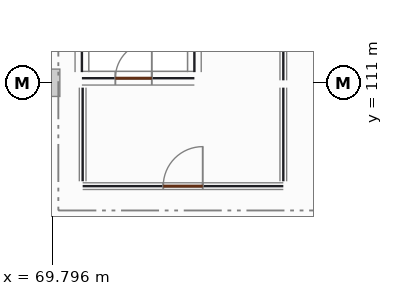
"""IFC4 building model, lengths in metres.
Left out: names, types, materials, properties, quantities, classifications, styles, units other than length and angle.
Written with IfcOpenShell. Run it as: python <this file> out.ifc"""

import sys

from ifc_helpers import new_model, si_unit, direction, frame, frame_2d, origin, origin_2d, place, context, subcontext, project, spatial, rectangle, extrude, element, fill, save


model = new_model("IFC4")
c1 = context("Model", 3, precision=1e-05, world=origin(), true_north=direction((0.0, 1.0)))
c2 = subcontext(c1, "Body", "Model", "MODEL_VIEW")
j1 = project(units=[si_unit("LENGTHUNIT", "METRE"), si_unit("PLANEANGLEUNIT", "RADIAN")], contexts=[c1])
p1 = place(None, origin())
s1 = spatial("IfcSite", under=j1, at=p1, CompositionType="ELEMENT")
p2 = place(p1, origin())
s2 = spatial("IfcBuilding", under=s1, at=p2, CompositionType="ELEMENT")
p3 = place(p2, origin())
s3 = spatial("IfcBuildingStorey", under=s2, at=p3, CompositionType="ELEMENT", Elevation=0.0)
p4 = place(p3, frame((69.6, 111.0, 0.0), z_axis=(0.0, 0.0, 1.0), x_axis=(1.0, 0.0, 0.0)))
e1 = element("IfcColumn", 1, at=p4, inside=s3, PredefinedType="COLUMN", context=c2, shape_type="SweptSolid", body=[
    extrude(rectangle(XDim=0.9, YDim=0.9, at=origin_2d()), origin(), (0.0, 0.0, 1.0), 5.08),
])
p5 = place(p3, frame((70.775, 111.15, 0.0), z_axis=(0.0, 0.0, 1.0), x_axis=(1.0, 0.0, 0.0)))
e2 = element("IfcWall", 2, at=p5, inside=s3, PredefinedType="SHEAR", context=c2, shape_type="SweptSolid", body=[
    extrude(rectangle(XDim=3.7, YDim=0.45, at=frame_2d((1.85, 0.0))), origin(), (0.0, 0.0, 1.0), 5.08),
])
p6 = place(p5, frame((1.1, 0.0, 0.0)))
e3 = element("IfcOpeningElement", 3, at=p6, cuts=e2, PredefinedType="OPENING", context=c2, shape_type="SweptSolid", body=[
    extrude(rectangle(XDim=1.2, YDim=2.2, at=frame_2d((0.6, 1.1))), frame((0.0, 0.235, 0.0), z_axis=(0.0, -1.0, 0.0), x_axis=(1.0, 0.0, 0.0)), (0.0, 0.0, 1.0), 0.47),
])
for number, where, z_axis, x_axis in (
    (4, (70.775, 111.35, 0.0), (0.0, 0.0, 1.0), (0.0, 1.0, 0.0)),
    (5, (74.475, 111.35, 0.0), (0.0, 0.0, 1.0), (0.0, 1.0, 0.0)),
):
    element("IfcWall", number, at=place(p3, frame(where, z_axis=z_axis, x_axis=x_axis)), inside=s3, PredefinedType="SHEAR", context=c2, shape_type="SweptSolid", body=[
        extrude(rectangle(XDim=7.675, YDim=0.45, at=frame_2d((3.837, 0.0))), origin(), (0.0, 0.0, 1.0), 5.08),
    ])
p7 = place(p3, frame((70.8, 107.6, 0.0), z_axis=(0.0, 0.0, 1.0), x_axis=(1.0, 0.0, 0.0)))
e6 = element("IfcWall", 6, at=p7, inside=s3, PredefinedType="PARTITIONING", context=c2, shape_type="SweptSolid", body=[
    extrude(rectangle(XDim=6.6, YDim=0.22, at=frame_2d((3.3, 0.0))), origin(), (0.0, 0.0, 1.0), 4.12),
])
p8 = place(p7, frame((2.65, 0.0, 0.0)))
e7 = element("IfcOpeningElement", 7, at=p8, cuts=e6, PredefinedType="OPENING", context=c2, shape_type="SweptSolid", body=[
    extrude(rectangle(XDim=1.3, YDim=2.2, at=frame_2d((0.65, 1.1))), frame((0.0, 0.12, 0.0), z_axis=(0.0, -1.0, 0.0), x_axis=(1.0, 0.0, 0.0)), (0.0, 0.0, 1.0), 0.24),
])
p9 = place(p3, frame((77.4, 111.08, 0.0), z_axis=(0.0, 0.0, 1.0), x_axis=(0.0, 1.0, 0.0)))
e8 = element("IfcWall", 8, at=p9, inside=s3, PredefinedType="PARTITIONING", context=c2, shape_type="SweptSolid", body=[
    extrude(rectangle(XDim=2.32, YDim=0.22, at=frame_2d((1.16, 0.0))), origin(), (0.0, 0.0, 1.0), 4.12),
])
for number, where, z_axis, x_axis in (
    (9, (70.8, 107.76, 0.0), (0.0, 0.0, 1.0), (0.0, 1.0, 0.0)),
    (10, (77.4, 107.76, 0.0), (0.0, 0.0, 1.0), (0.0, 1.0, 0.0)),
):
    element("IfcWall", number, at=place(p3, frame(where, z_axis=z_axis, x_axis=x_axis)), inside=s3, PredefinedType="PARTITIONING", context=c2, shape_type="SweptSolid", body=[
        extrude(rectangle(XDim=3.08, YDim=0.22, at=frame_2d((1.54, 0.0))), origin(), (0.0, 0.0, 1.0), 4.12),
    ])
p10 = place(p6, origin())
e11 = element("IfcDoor", 11, at=p10, inside=s3, OperationType="SINGLE_SWING_RIGHT", PredefinedType="DOOR", context=c2, shape_type="SweptSolid", body=[
    extrude(rectangle(XDim=1.2, YDim=2.2, at=frame_2d((0.6, 1.1))), frame((0.0, 0.025, 0.0), z_axis=(0.0, -1.0, 0.0), x_axis=(1.0, 0.0, 0.0)), (0.0, 0.0, 1.0), 0.05),
])
fill(e3, e11)
p11 = place(p8, origin())
e12 = element("IfcDoor", 12, at=p11, inside=s3, OperationType="SINGLE_SWING_RIGHT", PredefinedType="DOOR", context=c2, shape_type="SweptSolid", body=[
    extrude(rectangle(XDim=1.3, YDim=2.2, at=frame_2d((0.65, 1.1))), frame((0.0, 0.025, 0.0), z_axis=(0.0, -1.0, 0.0), x_axis=(1.0, 0.0, 0.0)), (0.0, 0.0, 1.0), 0.05),
])
fill(e7, e12)
save(model, sys.argv[1])
